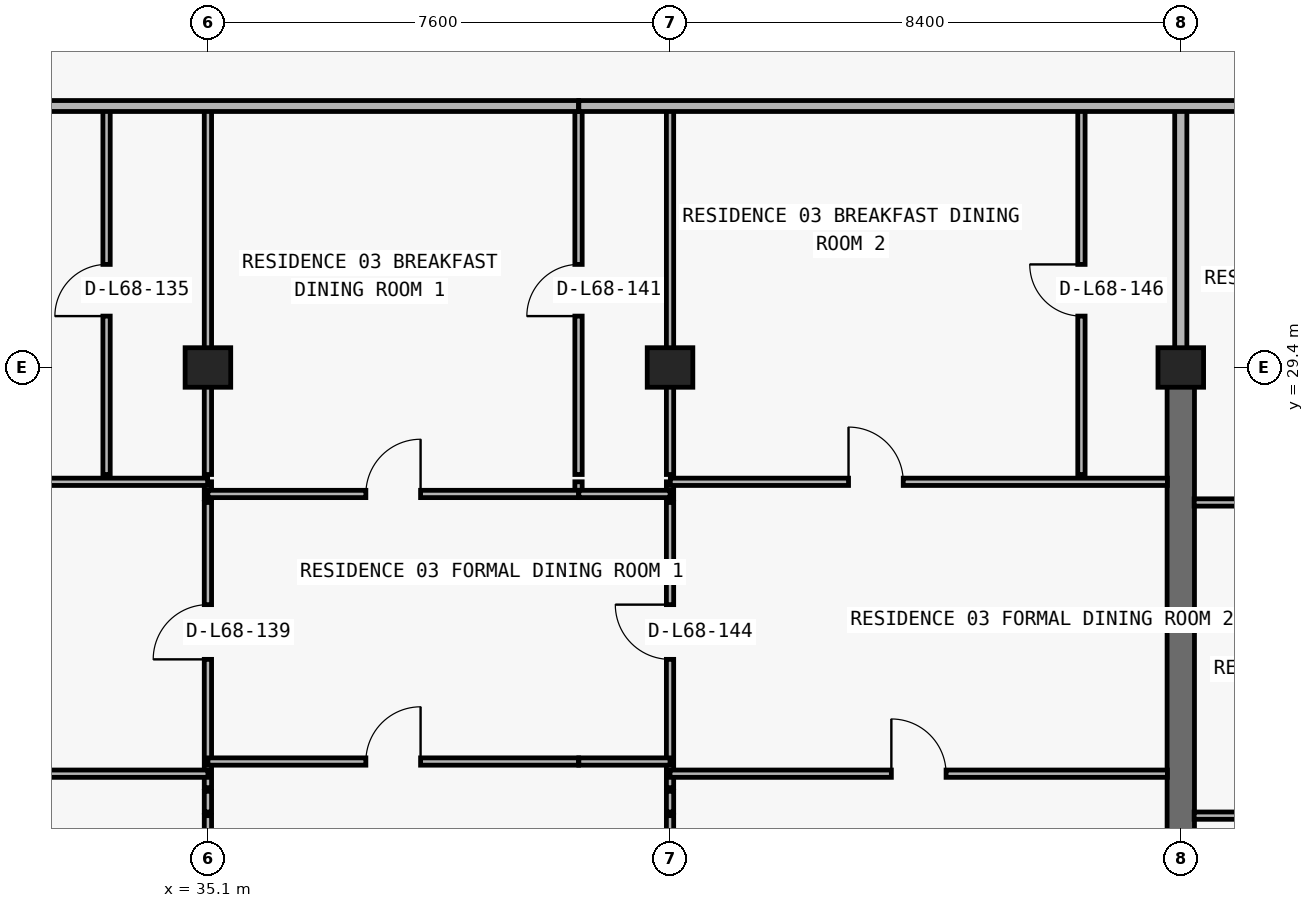
"""IFC4 building model, lengths in metres.
Left out: names, types, materials, properties, quantities, classifications, styles, units other than length and angle.
Written with IfcOpenShell. Run it as: python <this file> out.ifc"""

import sys

from ifc_helpers import new_model, si_unit, direction, frame, frame_2d, origin, origin_2d, place, context, subcontext, project, spatial, rectangle, extrude, element, fill, save


model = new_model("IFC4")
c1 = context("Model", 3, precision=1e-05, world=origin(), true_north=direction((0.0, 1.0)))
c2 = subcontext(c1, "Body", "Model", "MODEL_VIEW")
j1 = project(units=[si_unit("LENGTHUNIT", "METRE"), si_unit("PLANEANGLEUNIT", "RADIAN")], contexts=[c1])
p1 = place(None, origin())
s1 = spatial("IfcSite", under=j1, at=p1, CompositionType="ELEMENT")
p2 = place(p1, origin())
s2 = spatial("IfcBuilding", under=s1, at=p2, CompositionType="ELEMENT")
p3 = place(p2, frame((0.0, 0.0, 243.0)))
s3 = spatial("IfcBuildingStorey", under=s2, at=p3, CompositionType="ELEMENT", Elevation=243.0)
for number, where, z_axis, x_axis in (
    (1, (35.1, 29.4, 0.0), (0.0, 0.0, 1.0), (1.0, 0.0, 0.0)),
    (2, (42.7, 29.4, 0.0), (0.0, 0.0, 1.0), (1.0, 0.0, 0.0)),
    (3, (51.1, 29.4, 0.0), (0.0, 0.0, 1.0), (1.0, 0.0, 0.0)),
):
    element("IfcColumn", number, at=place(p3, frame(where, z_axis=z_axis, x_axis=x_axis)), inside=s3, PredefinedType="COLUMN", context=c2, shape_type="SweptSolid", body=[
        extrude(rectangle(XDim=0.75, YDim=0.65, at=origin_2d()), origin(), (0.0, 0.0, 1.0), 3.05),
    ])
p4 = place(p3, frame((51.1, 20.8, 0.0), z_axis=(0.0, 0.0, 1.0), x_axis=(0.0, 1.0, 0.0)))
e4 = element("IfcWall", 4, at=p4, inside=s3, PredefinedType="SHEAR", context=c2, shape_type="SweptSolid", body=[
    extrude(rectangle(XDim=8.6, YDim=0.45, at=frame_2d((4.3, 0.0))), origin(), (0.0, 0.0, 1.0), 3.05),
])
p5 = place(p3, frame((33.433, 27.64, 0.0), z_axis=(0.0, 0.0, 1.0), x_axis=(0.0, 1.0, 0.0)))
e5 = element("IfcWall", 5, at=p5, inside=s3, PredefinedType="PARTITIONING", context=c2, shape_type="SweptSolid", body=[
    extrude(rectangle(XDim=6.06, YDim=0.12, at=frame_2d((3.03, 0.0))), origin(), (0.0, 0.0, 1.0), 3.05),
])
p6 = place(p5, frame((2.605, 0.0, 0.0)))
e6 = element("IfcOpeningElement", 6, at=p6, cuts=e5, PredefinedType="OPENING", context=c2, shape_type="SweptSolid", body=[
    extrude(rectangle(XDim=0.85, YDim=2.1, at=frame_2d((0.425, 1.05))), frame((0.0, 0.07, 0.0), z_axis=(0.0, -1.0, 0.0), x_axis=(1.0, 0.0, 0.0)), (0.0, 0.0, 1.0), 0.14),
])
p7 = place(p3, frame((35.1, 13.34, 0.0), z_axis=(0.0, 0.0, 1.0), x_axis=(0.0, 1.0, 0.0)))
e7 = element("IfcWall", 7, at=p7, inside=s3, PredefinedType="PARTITIONING", context=c2, shape_type="SweptSolid", body=[
    extrude(rectangle(XDim=8.69, YDim=0.12, at=frame_2d((4.345, 0.0))), origin(), (0.0, 0.0, 1.0), 2.263),
])
p8 = place(p3, frame((35.1, 22.09, 0.0), z_axis=(0.0, 0.0, 1.0), x_axis=(0.0, 1.0, 0.0)))
e8 = element("IfcWall", 8, at=p8, inside=s3, PredefinedType="PARTITIONING", context=c2, shape_type="SweptSolid", body=[
    extrude(rectangle(XDim=0.34, YDim=0.12, at=frame_2d((0.17, 0.0))), origin(), (0.0, 0.0, 1.0), 2.263),
])
p9 = place(p3, frame((35.1, 22.49, 0.0), z_axis=(0.0, 0.0, 1.0), x_axis=(0.0, 1.0, 0.0)))
e9 = element("IfcWall", 9, at=p9, inside=s3, PredefinedType="PARTITIONING", context=c2, shape_type="SweptSolid", body=[
    extrude(rectangle(XDim=4.69, YDim=0.12, at=frame_2d((2.345, 0.0))), origin(), (0.0, 0.0, 1.0), 2.263),
])
p10 = place(p9, frame((2.11, 0.0, 0.0)))
e10 = element("IfcOpeningElement", 10, at=p10, cuts=e9, PredefinedType="OPENING", context=c2, shape_type="SweptSolid", body=[
    extrude(rectangle(XDim=0.9, YDim=2.15, at=frame_2d((0.45, 1.075))), frame((0.0, 0.07, 0.0), z_axis=(0.0, -1.0, 0.0), x_axis=(1.0, 0.0, 0.0)), (0.0, 0.0, 1.0), 0.14),
])
p11 = place(p3, frame((35.1, 27.24, 0.0), z_axis=(0.0, 0.0, 1.0), x_axis=(0.0, 1.0, 0.0)))
e11 = element("IfcWall", 11, at=p11, inside=s3, PredefinedType="PARTITIONING", context=c2, shape_type="SweptSolid", body=[
    extrude(rectangle(XDim=0.28, YDim=0.12, at=frame_2d((0.14, 0.0))), origin(), (0.0, 0.0, 1.0), 2.263),
])
p12 = place(p3, frame((35.1, 27.64, 0.0), z_axis=(0.0, 0.0, 1.0), x_axis=(0.0, 1.0, 0.0)))
e12 = element("IfcWall", 12, at=p12, inside=s3, PredefinedType="PARTITIONING", context=c2, shape_type="SweptSolid", body=[
    extrude(rectangle(XDim=6.06, YDim=0.12, at=frame_2d((3.03, 0.0))), origin(), (0.0, 0.0, 1.0), 2.263),
])
p13 = place(p3, frame((41.195, 27.32, 0.0), z_axis=(0.0, 0.0, 1.0), x_axis=(0.0, 1.0, 0.0)))
e13 = element("IfcWall", 13, at=p13, inside=s3, PredefinedType="PARTITIONING", context=c2, shape_type="SweptSolid", body=[
    extrude(rectangle(XDim=0.2, YDim=0.12, at=frame_2d((0.1, 0.0))), origin(), (0.0, 0.0, 1.0), 3.05),
])
p14 = place(p3, frame((41.195, 27.64, 0.0), z_axis=(0.0, 0.0, 1.0), x_axis=(0.0, 1.0, 0.0)))
e14 = element("IfcWall", 14, at=p14, inside=s3, PredefinedType="PARTITIONING", context=c2, shape_type="SweptSolid", body=[
    extrude(rectangle(XDim=6.06, YDim=0.12, at=frame_2d((3.03, 0.0))), origin(), (0.0, 0.0, 1.0), 3.05),
])
p15 = place(p14, frame((2.605, 0.0, 0.0)))
e15 = element("IfcOpeningElement", 15, at=p15, cuts=e14, PredefinedType="OPENING", context=c2, shape_type="SweptSolid", body=[
    extrude(rectangle(XDim=0.85, YDim=2.1, at=frame_2d((0.425, 1.05))), frame((0.0, 0.07, 0.0), z_axis=(0.0, -1.0, 0.0), x_axis=(1.0, 0.0, 0.0)), (0.0, 0.0, 1.0), 0.14),
])
p16 = place(p3, frame((42.7, 13.34, 0.0), z_axis=(0.0, 0.0, 1.0), x_axis=(0.0, 1.0, 0.0)))
e16 = element("IfcWall", 16, at=p16, inside=s3, PredefinedType="PARTITIONING", context=c2, shape_type="SweptSolid", body=[
    extrude(rectangle(XDim=8.69, YDim=0.12, at=frame_2d((4.345, 0.0))), origin(), (0.0, 0.0, 1.0), 2.263),
])
p17 = place(p3, frame((42.7, 22.09, 0.0), z_axis=(0.0, 0.0, 1.0), x_axis=(0.0, 1.0, 0.0)))
e17 = element("IfcWall", 17, at=p17, inside=s3, PredefinedType="PARTITIONING", context=c2, shape_type="SweptSolid", body=[
    extrude(rectangle(XDim=0.34, YDim=0.12, at=frame_2d((0.17, 0.0))), origin(), (0.0, 0.0, 1.0), 2.263),
])
p18 = place(p3, frame((42.7, 22.49, 0.0), z_axis=(0.0, 0.0, 1.0), x_axis=(0.0, 1.0, 0.0)))
e18 = element("IfcWall", 18, at=p18, inside=s3, PredefinedType="PARTITIONING", context=c2, shape_type="SweptSolid", body=[
    extrude(rectangle(XDim=4.69, YDim=0.12, at=frame_2d((2.345, 0.0))), origin(), (0.0, 0.0, 1.0), 2.263),
])
p19 = place(p18, frame((2.11, 0.0, 0.0)))
e19 = element("IfcOpeningElement", 19, at=p19, cuts=e18, PredefinedType="OPENING", context=c2, shape_type="SweptSolid", body=[
    extrude(rectangle(XDim=0.9, YDim=2.15, at=frame_2d((0.45, 1.075))), frame((0.0, 0.07, 0.0), z_axis=(0.0, -1.0, 0.0), x_axis=(1.0, 0.0, 0.0)), (0.0, 0.0, 1.0), 0.14),
])
p20 = place(p3, frame((42.7, 27.24, 0.0), z_axis=(0.0, 0.0, 1.0), x_axis=(0.0, 1.0, 0.0)))
e20 = element("IfcWall", 20, at=p20, inside=s3, PredefinedType="PARTITIONING", context=c2, shape_type="SweptSolid", body=[
    extrude(rectangle(XDim=0.28, YDim=0.12, at=frame_2d((0.14, 0.0))), origin(), (0.0, 0.0, 1.0), 2.263),
])
p21 = place(p3, frame((42.7, 27.64, 0.0), z_axis=(0.0, 0.0, 1.0), x_axis=(0.0, 1.0, 0.0)))
e21 = element("IfcWall", 21, at=p21, inside=s3, PredefinedType="PARTITIONING", context=c2, shape_type="SweptSolid", body=[
    extrude(rectangle(XDim=6.06, YDim=0.12, at=frame_2d((3.03, 0.0))), origin(), (0.0, 0.0, 1.0), 2.263),
])
p22 = place(p3, frame((49.466, 27.64, 0.0), z_axis=(0.0, 0.0, 1.0), x_axis=(0.0, 1.0, 0.0)))
e22 = element("IfcWall", 22, at=p22, inside=s3, PredefinedType="PARTITIONING", context=c2, shape_type="SweptSolid", body=[
    extrude(rectangle(XDim=6.06, YDim=0.12, at=frame_2d((3.03, 0.0))), origin(), (0.0, 0.0, 1.0), 3.05),
])
p23 = place(p22, frame((2.605, 0.0, 0.0)))
e23 = element("IfcOpeningElement", 23, at=p23, cuts=e22, PredefinedType="OPENING", context=c2, shape_type="SweptSolid", body=[
    extrude(rectangle(XDim=0.85, YDim=2.1, at=frame_2d((0.425, 1.05))), frame((0.0, 0.07, 0.0), z_axis=(0.0, -1.0, 0.0), x_axis=(1.0, 0.0, 0.0)), (0.0, 0.0, 1.0), 0.14),
])
p24 = place(p3, frame((51.1, 29.405, 0.0), z_axis=(0.0, 0.0, 1.0), x_axis=(0.0, 1.0, 0.0)))
e24 = element("IfcWall", 24, at=p24, inside=s3, PredefinedType="PARTITIONING", context=c2, shape_type="SweptSolid", body=[
    extrude(rectangle(XDim=4.295, YDim=0.2, at=frame_2d((2.147, 0.0))), origin(), (0.0, 0.0, 1.0), 2.335),
])
p25 = place(p3, frame((51.32, 22.03, 0.0), z_axis=(0.0, 0.0, 1.0), x_axis=(1.0, 0.0, 0.0)))
e25 = element("IfcWall", 25, at=p25, inside=s3, PredefinedType="PARTITIONING", context=c2, shape_type="SweptSolid", body=[
    extrude(rectangle(XDim=8.18, YDim=0.12, at=frame_2d((4.09, 0.0))), origin(), (0.0, 0.0, 1.0), 3.05),
])
p26 = place(p25, frame((1.583, 0.0, 0.0)))
e26 = element("IfcOpeningElement", 26, at=p26, cuts=e25, PredefinedType="OPENING", context=c2, shape_type="SweptSolid", body=[
    extrude(rectangle(XDim=0.9, YDim=2.15, at=frame_2d((0.45, 1.075))), frame((0.0, 0.07, 0.0), z_axis=(0.0, -1.0, 0.0), x_axis=(1.0, 0.0, 0.0)), (0.0, 0.0, 1.0), 0.14),
])
p27 = place(p25, frame((5.84, 0.0, 0.0)))
e27 = element("IfcOpeningElement", 27, at=p27, cuts=e25, PredefinedType="OPENING", context=c2, shape_type="SweptSolid", body=[
    extrude(rectangle(XDim=0.9, YDim=2.15, at=frame_2d((0.45, 1.075))), frame((0.0, 0.07, 0.0), z_axis=(0.0, -1.0, 0.0), x_axis=(1.0, 0.0, 0.0)), (0.0, 0.0, 1.0), 0.14),
])
p28 = place(p3, frame((26.92, 22.72, 0.0), z_axis=(0.0, 0.0, 1.0), x_axis=(1.0, 0.0, 0.0)))
e28 = element("IfcWall", 28, at=p28, inside=s3, PredefinedType="PARTITIONING", context=c2, shape_type="SweptSolid", body=[
    extrude(rectangle(XDim=8.18, YDim=0.12, at=frame_2d((4.09, 0.0))), origin(), (0.0, 0.0, 1.0), 3.05),
])
p29 = place(p28, frame((1.33, 0.0, 0.0)))
e29 = element("IfcOpeningElement", 29, at=p29, cuts=e28, PredefinedType="OPENING", context=c2, shape_type="SweptSolid", body=[
    extrude(rectangle(XDim=0.9, YDim=2.15, at=frame_2d((0.45, 1.075))), frame((0.0, 0.07, 0.0), z_axis=(0.0, -1.0, 0.0), x_axis=(1.0, 0.0, 0.0)), (0.0, 0.0, 1.0), 0.14),
])
p30 = place(p3, frame((42.7, 22.72, 0.0), z_axis=(0.0, 0.0, 1.0), x_axis=(1.0, 0.0, 0.0)))
e30 = element("IfcWall", 30, at=p30, inside=s3, PredefinedType="PARTITIONING", context=c2, shape_type="SweptSolid", body=[
    extrude(rectangle(XDim=8.18, YDim=0.12, at=frame_2d((4.09, 0.0))), origin(), (0.0, 0.0, 1.0), 3.05),
])
p31 = place(p30, frame((3.64, 0.0, 0.0)))
e31 = element("IfcOpeningElement", 31, at=p31, cuts=e30, PredefinedType="OPENING", context=c2, shape_type="SweptSolid", body=[
    extrude(rectangle(XDim=0.9, YDim=2.15, at=frame_2d((0.45, 1.075))), frame((0.0, 0.07, 0.0), z_axis=(0.0, -1.0, 0.0), x_axis=(1.0, 0.0, 0.0)), (0.0, 0.0, 1.0), 0.14),
])
p32 = place(p3, frame((35.1, 22.92, 0.0), z_axis=(0.0, 0.0, 1.0), x_axis=(1.0, 0.0, 0.0)))
e32 = element("IfcWall", 32, at=p32, inside=s3, PredefinedType="PARTITIONING", context=c2, shape_type="SweptSolid", body=[
    extrude(rectangle(XDim=6.095, YDim=0.12, at=frame_2d((3.047, 0.0))), origin(), (0.0, 0.0, 1.0), 3.05),
])
p33 = place(p32, frame((2.597, 0.0, 0.0)))
e33 = element("IfcOpeningElement", 33, at=p33, cuts=e32, PredefinedType="OPENING", context=c2, shape_type="SweptSolid", body=[
    extrude(rectangle(XDim=0.9, YDim=2.15, at=frame_2d((0.45, 1.075))), frame((0.0, 0.07, 0.0), z_axis=(0.0, -1.0, 0.0), x_axis=(1.0, 0.0, 0.0)), (0.0, 0.0, 1.0), 0.14),
])
p34 = place(p3, frame((41.2, 22.92, 0.0), z_axis=(0.0, 0.0, 1.0), x_axis=(1.0, 0.0, 0.0)))
e34 = element("IfcWall", 34, at=p34, inside=s3, PredefinedType="PARTITIONING", context=c2, shape_type="SweptSolid", body=[
    extrude(rectangle(XDim=1.5, YDim=0.12, at=frame_2d((0.75, 0.0))), origin(), (0.0, 0.0, 1.0), 3.05),
])
p35 = place(p3, frame((51.32, 27.18, 0.0), z_axis=(0.0, 0.0, 1.0), x_axis=(1.0, 0.0, 0.0)))
e35 = element("IfcWall", 35, at=p35, inside=s3, PredefinedType="PARTITIONING", context=c2, shape_type="SweptSolid", body=[
    extrude(rectangle(XDim=8.18, YDim=0.12, at=frame_2d((4.09, 0.0))), origin(), (0.0, 0.0, 1.0), 3.05),
])
p36 = place(p35, frame((1.583, 0.0, 0.0)))
e36 = element("IfcOpeningElement", 36, at=p36, cuts=e35, PredefinedType="OPENING", context=c2, shape_type="SweptSolid", body=[
    extrude(rectangle(XDim=0.9, YDim=2.15, at=frame_2d((0.45, 1.075))), frame((0.0, 0.07, 0.0), z_axis=(0.0, -1.0, 0.0), x_axis=(1.0, 0.0, 0.0)), (0.0, 0.0, 1.0), 0.14),
])
p37 = place(p3, frame((35.1, 27.32, 0.0), z_axis=(0.0, 0.0, 1.0), x_axis=(1.0, 0.0, 0.0)))
e37 = element("IfcWall", 37, at=p37, inside=s3, PredefinedType="PARTITIONING", context=c2, shape_type="SweptSolid", body=[
    extrude(rectangle(XDim=6.095, YDim=0.12, at=frame_2d((3.047, 0.0))), origin(), (0.0, 0.0, 1.0), 3.05),
])
p38 = place(p37, frame((2.597, 0.0, 0.0)))
e38 = element("IfcOpeningElement", 38, at=p38, cuts=e37, PredefinedType="OPENING", context=c2, shape_type="SweptSolid", body=[
    extrude(rectangle(XDim=0.9, YDim=2.15, at=frame_2d((0.45, 1.075))), frame((0.0, 0.07, 0.0), z_axis=(0.0, -1.0, 0.0), x_axis=(1.0, 0.0, 0.0)), (0.0, 0.0, 1.0), 0.14),
])
p39 = place(p3, frame((41.2, 27.32, 0.0), z_axis=(0.0, 0.0, 1.0), x_axis=(1.0, 0.0, 0.0)))
e39 = element("IfcWall", 39, at=p39, inside=s3, PredefinedType="PARTITIONING", context=c2, shape_type="SweptSolid", body=[
    extrude(rectangle(XDim=1.5, YDim=0.12, at=frame_2d((0.75, 0.0))), origin(), (0.0, 0.0, 1.0), 3.05),
])
p40 = place(p3, frame((26.92, 27.52, 0.0), z_axis=(0.0, 0.0, 1.0), x_axis=(1.0, 0.0, 0.0)))
e40 = element("IfcWall", 40, at=p40, inside=s3, PredefinedType="PARTITIONING", context=c2, shape_type="SweptSolid", body=[
    extrude(rectangle(XDim=8.175, YDim=0.12, at=frame_2d((4.087, 0.0))), origin(), (0.0, 0.0, 1.0), 3.05),
])
p41 = place(p40, frame((1.33, 0.0, 0.0)))
e41 = element("IfcOpeningElement", 41, at=p41, cuts=e40, PredefinedType="OPENING", context=c2, shape_type="SweptSolid", body=[
    extrude(rectangle(XDim=0.9, YDim=2.15, at=frame_2d((0.45, 1.075))), frame((0.0, 0.07, 0.0), z_axis=(0.0, -1.0, 0.0), x_axis=(1.0, 0.0, 0.0)), (0.0, 0.0, 1.0), 0.14),
])
p42 = place(p3, frame((42.705, 27.52, 0.0), z_axis=(0.0, 0.0, 1.0), x_axis=(1.0, 0.0, 0.0)))
e42 = element("IfcWall", 42, at=p42, inside=s3, PredefinedType="PARTITIONING", context=c2, shape_type="SweptSolid", body=[
    extrude(rectangle(XDim=8.175, YDim=0.12, at=frame_2d((4.087, 0.0))), origin(), (0.0, 0.0, 1.0), 3.05),
])
p43 = place(p42, frame((2.93, 0.0, 0.0)))
e43 = element("IfcOpeningElement", 43, at=p43, cuts=e42, PredefinedType="OPENING", context=c2, shape_type="SweptSolid", body=[
    extrude(rectangle(XDim=0.9, YDim=2.15, at=frame_2d((0.45, 1.075))), frame((0.0, 0.07, 0.0), z_axis=(0.0, -1.0, 0.0), x_axis=(1.0, 0.0, 0.0)), (0.0, 0.0, 1.0), 0.14),
])
p44 = place(p3, frame((15.203, 33.7, 0.0), z_axis=(0.0, 0.0, 1.0), x_axis=(1.0, 0.0, 0.0)))
e44 = element("IfcWall", 44, at=p44, inside=s3, PredefinedType="PARTITIONING", context=c2, shape_type="SweptSolid", body=[
    extrude(rectangle(XDim=25.992, YDim=0.18, at=frame_2d((12.996, 0.0))), origin(), (0.0, 0.0, 1.0), 3.05),
])
p45 = place(p44, frame((5.972, 0.0, 0.0)))
e45 = element("IfcOpeningElement", 45, at=p45, cuts=e44, PredefinedType="OPENING", context=c2, shape_type="SweptSolid", body=[
    extrude(rectangle(XDim=1.0, YDim=2.2, at=frame_2d((0.5, 1.1))), frame((0.0, 0.1, 0.0), z_axis=(0.0, -1.0, 0.0), x_axis=(1.0, 0.0, 0.0)), (0.0, 0.0, 1.0), 0.2),
])
p46 = place(p44, frame((14.364, 0.0, 0.0)))
e46 = element("IfcOpeningElement", 46, at=p46, cuts=e44, PredefinedType="OPENING", context=c2, shape_type="SweptSolid", body=[
    extrude(rectangle(XDim=1.0, YDim=2.2, at=frame_2d((0.5, 1.1))), frame((0.0, 0.1, 0.0), z_axis=(0.0, -1.0, 0.0), x_axis=(1.0, 0.0, 0.0)), (0.0, 0.0, 1.0), 0.2),
])
p47 = place(p3, frame((41.2, 33.7, 0.0), z_axis=(0.0, 0.0, 1.0), x_axis=(1.0, 0.0, 0.0)))
e47 = element("IfcWall", 47, at=p47, inside=s3, PredefinedType="PARTITIONING", context=c2, shape_type="SweptSolid", body=[
    extrude(rectangle(XDim=24.5, YDim=0.18, at=frame_2d((12.25, 0.0))), origin(), (0.0, 0.0, 1.0), 3.05),
])
p48 = place(p47, frame((12.775, 0.0, 0.0)))
e48 = element("IfcOpeningElement", 48, at=p48, cuts=e47, PredefinedType="OPENING", context=c2, shape_type="SweptSolid", body=[
    extrude(rectangle(XDim=1.0, YDim=2.2, at=frame_2d((0.5, 1.1))), frame((0.0, 0.1, 0.0), z_axis=(0.0, -1.0, 0.0), x_axis=(1.0, 0.0, 0.0)), (0.0, 0.0, 1.0), 0.2),
])
p49 = place(p47, frame((20.059, 0.0, 0.0)))
e49 = element("IfcOpeningElement", 49, at=p49, cuts=e47, PredefinedType="OPENING", context=c2, shape_type="SweptSolid", body=[
    extrude(rectangle(XDim=1.0, YDim=2.2, at=frame_2d((0.5, 1.1))), frame((0.0, 0.1, 0.0), z_axis=(0.0, -1.0, 0.0), x_axis=(1.0, 0.0, 0.0)), (0.0, 0.0, 1.0), 0.2),
])
p50 = place(p6, origin())
e50 = element("IfcDoor", 50, at=p50, inside=s3, OperationType="SINGLE_SWING_LEFT", PredefinedType="DOOR", context=c2, shape_type="SweptSolid", body=[
    extrude(rectangle(XDim=0.85, YDim=2.1, at=frame_2d((0.425, 1.05))), frame((0.0, 0.025, 0.0), z_axis=(0.0, -1.0, 0.0), x_axis=(1.0, 0.0, 0.0)), (0.0, 0.0, 1.0), 0.05),
])
fill(e6, e50)
p51 = place(p10, origin())
e51 = element("IfcDoor", 51, at=p51, inside=s3, OperationType="SINGLE_SWING_LEFT", PredefinedType="DOOR", context=c2, shape_type="SweptSolid", body=[
    extrude(rectangle(XDim=0.9, YDim=2.15, at=frame_2d((0.45, 1.075))), frame((0.0, 0.025, 0.0), z_axis=(0.0, -1.0, 0.0), x_axis=(1.0, 0.0, 0.0)), (0.0, 0.0, 1.0), 0.05),
])
fill(e10, e51)
p52 = place(p38, origin())
e52 = element("IfcDoor", 52, at=p52, inside=s3, OperationType="SINGLE_SWING_RIGHT", PredefinedType="DOOR", context=c2, shape_type="SweptSolid", body=[
    extrude(rectangle(XDim=0.9, YDim=2.15, at=frame_2d((0.45, 1.075))), frame((0.0, 0.025, 0.0), z_axis=(0.0, -1.0, 0.0), x_axis=(1.0, 0.0, 0.0)), (0.0, 0.0, 1.0), 0.05),
])
fill(e38, e52)
p53 = place(p15, origin())
e53 = element("IfcDoor", 53, at=p53, inside=s3, OperationType="SINGLE_SWING_LEFT", PredefinedType="DOOR", context=c2, shape_type="SweptSolid", body=[
    extrude(rectangle(XDim=0.85, YDim=2.1, at=frame_2d((0.425, 1.05))), frame((0.0, 0.025, 0.0), z_axis=(0.0, -1.0, 0.0), x_axis=(1.0, 0.0, 0.0)), (0.0, 0.0, 1.0), 0.05),
])
fill(e15, e53)
p54 = place(p33, origin())
e54 = element("IfcDoor", 54, at=p54, inside=s3, OperationType="SINGLE_SWING_RIGHT", PredefinedType="DOOR", context=c2, shape_type="SweptSolid", body=[
    extrude(rectangle(XDim=0.9, YDim=2.15, at=frame_2d((0.45, 1.075))), frame((0.0, 0.025, 0.0), z_axis=(0.0, -1.0, 0.0), x_axis=(1.0, 0.0, 0.0)), (0.0, 0.0, 1.0), 0.05),
])
fill(e33, e54)
p55 = place(p19, origin())
e55 = element("IfcDoor", 55, at=p55, inside=s3, OperationType="SINGLE_SWING_RIGHT", PredefinedType="DOOR", context=c2, shape_type="SweptSolid", body=[
    extrude(rectangle(XDim=0.9, YDim=2.15, at=frame_2d((0.45, 1.075))), frame((0.0, 0.025, 0.0), z_axis=(0.0, -1.0, 0.0), x_axis=(1.0, 0.0, 0.0)), (0.0, 0.0, 1.0), 0.05),
])
fill(e19, e55)
p56 = place(p43, origin())
e56 = element("IfcDoor", 56, at=p56, inside=s3, OperationType="SINGLE_SWING_LEFT", PredefinedType="DOOR", context=c2, shape_type="SweptSolid", body=[
    extrude(rectangle(XDim=0.9, YDim=2.15, at=frame_2d((0.45, 1.075))), frame((0.0, 0.025, 0.0), z_axis=(0.0, -1.0, 0.0), x_axis=(1.0, 0.0, 0.0)), (0.0, 0.0, 1.0), 0.05),
])
fill(e43, e56)
p57 = place(p23, origin())
e57 = element("IfcDoor", 57, at=p57, inside=s3, OperationType="SINGLE_SWING_RIGHT", PredefinedType="DOOR", context=c2, shape_type="SweptSolid", body=[
    extrude(rectangle(XDim=0.85, YDim=2.1, at=frame_2d((0.425, 1.05))), frame((0.0, 0.025, 0.0), z_axis=(0.0, -1.0, 0.0), x_axis=(1.0, 0.0, 0.0)), (0.0, 0.0, 1.0), 0.05),
])
fill(e23, e57)
p58 = place(p31, origin())
e58 = element("IfcDoor", 58, at=p58, inside=s3, OperationType="SINGLE_SWING_LEFT", PredefinedType="DOOR", context=c2, shape_type="SweptSolid", body=[
    extrude(rectangle(XDim=0.9, YDim=2.15, at=frame_2d((0.45, 1.075))), frame((0.0, 0.025, 0.0), z_axis=(0.0, -1.0, 0.0), x_axis=(1.0, 0.0, 0.0)), (0.0, 0.0, 1.0), 0.05),
])
fill(e31, e58)
save(model, sys.argv[1])
